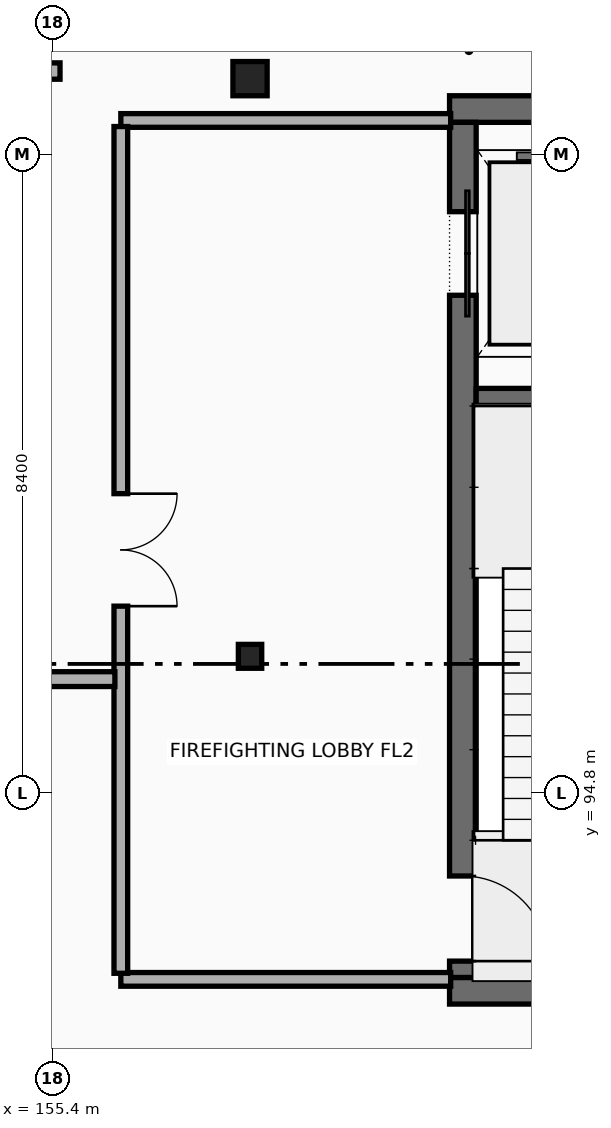
"""IFC4 building model, lengths in metres.
Left out: names, types, materials, properties, quantities, classifications, styles, units other than length and angle.
Written with IfcOpenShell. Run it as: python <this file> out.ifc"""

import sys

from ifc_helpers import new_model, si_unit, direction, frame, frame_2d, origin, origin_2d, place, context, subcontext, project, spatial, rectangle, i_section, extrude, element, fill, save


model = new_model("IFC4")
c1 = context("Model", 3, precision=1e-05, world=origin(), true_north=direction((0.0, 1.0)))
c2 = subcontext(c1, "Body", "Model", "MODEL_VIEW")
j1 = project(units=[si_unit("LENGTHUNIT", "METRE"), si_unit("PLANEANGLEUNIT", "RADIAN")], contexts=[c1])
p1 = place(None, origin())
s1 = spatial("IfcSite", under=j1, at=p1, CompositionType="ELEMENT")
p2 = place(p1, origin())
s2 = spatial("IfcBuilding", under=s1, at=p2, CompositionType="ELEMENT")
p3 = place(p2, origin())
s3 = spatial("IfcBuildingStorey", under=s2, at=p3, CompositionType="ELEMENT", Elevation=0.0)
for number, where, z_axis, x_axis in (
    (1, (160.625, 92.2, 0.0), (0.0, 0.0, 1.0), (1.0, 0.0, 0.0)),
    (2, (165.375, 103.8, 0.0), (0.0, 0.0, 1.0), (-1.0, 0.0, 0.0)),
):
    element("IfcWall", number, at=place(p3, frame(where, z_axis=z_axis, x_axis=x_axis)), inside=s3, PredefinedType="SHEAR", context=c2, shape_type="SweptSolid", body=[
        extrude(rectangle(XDim=4.75, YDim=0.35, at=frame_2d((2.375, 0.0))), origin(), (0.0, 0.0, 1.0), 4.8),
    ])
p4 = place(p3, frame((160.8, 103.625, 0.0), z_axis=(0.0, 0.0, 1.0), x_axis=(0.0, -1.0, 0.0)))
e3 = element("IfcWall", 3, at=p4, inside=s3, PredefinedType="SHEAR", context=c2, shape_type="SweptSolid", body=[
    extrude(rectangle(XDim=11.25, YDim=0.35, at=frame_2d((5.625, 0.0))), origin(), (0.0, 0.0, 1.0), 4.8),
])
p5 = place(p4, frame((1.175, 0.0, 0.0)))
e4 = element("IfcOpeningElement", 4, at=p5, cuts=e3, PredefinedType="OPENING", context=c2, shape_type="SweptSolid", body=[
    extrude(rectangle(XDim=1.1, YDim=2.2, at=frame_2d((0.55, 1.1))), frame((0.0, 0.185, 0.0), z_axis=(0.0, -1.0, 0.0), x_axis=(1.0, 0.0, 0.0)), (0.0, 0.0, 1.0), 0.37),
])
p6 = place(p4, frame((9.915, 0.0, 0.0)))
e5 = element("IfcOpeningElement", 5, at=p6, cuts=e3, PredefinedType="OPENING", context=c2, shape_type="SweptSolid", body=[
    extrude(rectangle(XDim=1.12, YDim=2.16, at=frame_2d((0.56, 1.08))), frame((0.0, 0.185, 0.0), z_axis=(0.0, -1.0, 0.0), x_axis=(1.0, 0.0, 0.0)), (0.0, 0.0, 1.0), 0.37),
])
p7 = place(p3, frame((160.975, 100.0, 0.0), z_axis=(0.0, 0.0, 1.0), x_axis=(1.0, 0.0, 0.0)))
e6 = element("IfcWall", 6, at=p7, inside=s3, PredefinedType="SHEAR", context=c2, shape_type="SweptSolid", body=[
    extrude(rectangle(XDim=4.05, YDim=0.25, at=frame_2d((2.025, 0.0))), origin(), (0.0, 0.0, 1.0), 4.8),
])
p8 = place(p3, frame((158.0, 96.6, 0.0), z_axis=(0.0, 0.0, 1.0), x_axis=(1.0, 0.0, 0.0)))
e7 = element("IfcColumn", 7, at=p8, inside=s3, PredefinedType="COLUMN", context=c2, shape_type="SweptSolid", body=[
    extrude(i_section(OverallWidth=0.307, OverallDepth=0.314, WebThickness=0.012, FlangeThickness=0.019, at=origin_2d()), origin(), (0.0, 0.0, 1.0), 4.8),
])
p9 = place(p3, frame((158.0, 104.2, 0.0), z_axis=(0.0, 0.0, 1.0), x_axis=(1.0, 0.0, 0.0)))
e8 = element("IfcColumn", 8, at=p9, inside=s3, PredefinedType="COLUMN", context=c2, shape_type="SweptSolid", body=[
    extrude(rectangle(XDim=0.45, YDim=0.45, at=origin_2d()), origin(), (0.0, 0.0, 1.0), 4.8),
])
p10 = place(p3, frame((156.3, 92.35, 0.0), z_axis=(0.0, 0.0, 1.0), x_axis=(1.0, 0.0, 0.0)))
e9 = element("IfcWall", 9, at=p10, inside=s3, PredefinedType="PARTITIONING", context=c2, shape_type="SweptSolid", body=[
    extrude(rectangle(XDim=4.34, YDim=0.18, at=frame_2d((2.17, 0.0))), origin(), (0.0, 0.0, 1.0), 3.753),
])
p11 = place(p3, frame((160.64, 103.65, 0.0), z_axis=(0.0, 0.0, 1.0), x_axis=(-1.0, 0.0, 0.0)))
e10 = element("IfcWall", 10, at=p11, inside=s3, PredefinedType="PARTITIONING", context=c2, shape_type="SweptSolid", body=[
    extrude(rectangle(XDim=4.34, YDim=0.18, at=frame_2d((2.17, 0.0))), origin(), (0.0, 0.0, 1.0), 4.157),
])
p12 = place(p3, frame((156.3, 103.57, 0.0), z_axis=(0.0, 0.0, 1.0), x_axis=(0.0, -1.0, 0.0)))
e11 = element("IfcWall", 11, at=p12, inside=s3, PredefinedType="PARTITIONING", context=c2, shape_type="SweptSolid", body=[
    extrude(rectangle(XDim=11.14, YDim=0.18, at=frame_2d((5.57, 0.0))), origin(), (0.0, 0.0, 1.0), 4.152),
])
p13 = place(p12, frame((4.83, 0.0, 0.0)))
e12 = element("IfcOpeningElement", 12, at=p13, cuts=e11, PredefinedType="OPENING", context=c2, shape_type="SweptSolid", body=[
    extrude(rectangle(XDim=1.48, YDim=2.22, at=frame_2d((0.74, 1.11))), frame((0.0, 0.1, 0.0), z_axis=(0.0, -1.0, 0.0), x_axis=(1.0, 0.0, 0.0)), (0.0, 0.0, 1.0), 0.2),
])
p14 = place(p3, frame((128.341, 96.3, 0.0), z_axis=(0.0, 0.0, 1.0), x_axis=(1.0, 0.0, 0.0)))
e13 = element("IfcWall", 13, at=p14, inside=s3, PredefinedType="PARTITIONING", context=c2, shape_type="SweptSolid", body=[
    extrude(rectangle(XDim=27.881, YDim=0.195, at=frame_2d((13.94, 0.0))), origin(), (0.0, 0.0, 1.0), 3.753),
])
p15 = place(p3, frame((130.354, 104.3, 0.0), z_axis=(0.0, 0.0, 1.0), x_axis=(1.0, 0.0, 0.0)))
e14 = element("IfcWall", 14, at=p15, inside=s3, PredefinedType="PARTITIONING", context=c2, shape_type="SweptSolid", body=[
    extrude(rectangle(XDim=25.146, YDim=0.215, at=frame_2d((12.573, 0.0))), origin(), (0.0, 0.0, 1.0), 3.753),
])
p16 = place(p5, origin())
e15 = element("IfcDoor", 15, at=p16, inside=s3, OperationType="DOUBLE_DOOR_SLIDING", PredefinedType="DOOR", context=c2, shape_type="SweptSolid", body=[
    extrude(rectangle(XDim=1.1, YDim=2.2, at=frame_2d((0.55, 1.1))), frame((0.0, 0.025, 0.0), z_axis=(0.0, -1.0, 0.0), x_axis=(1.0, 0.0, 0.0)), (0.0, 0.0, 1.0), 0.05),
])
fill(e4, e15)
p17 = place(p6, origin())
e16 = element("IfcDoor", 16, at=p17, inside=s3, OperationType="SINGLE_SWING_RIGHT", PredefinedType="DOOR", context=c2, shape_type="SweptSolid", body=[
    extrude(rectangle(XDim=1.12, YDim=2.16, at=frame_2d((0.56, 1.08))), frame((0.0, 0.025, 0.0), z_axis=(0.0, -1.0, 0.0), x_axis=(1.0, 0.0, 0.0)), (0.0, 0.0, 1.0), 0.05),
])
fill(e5, e16)
p18 = place(p13, origin())
e17 = element("IfcDoor", 17, at=p18, inside=s3, OperationType="DOUBLE_DOOR_SINGLE_SWING", PredefinedType="DOOR", context=c2, shape_type="SweptSolid", body=[
    extrude(rectangle(XDim=1.48, YDim=2.22, at=frame_2d((0.74, 1.11))), frame((0.0, 0.025, 0.0), z_axis=(0.0, -1.0, 0.0), x_axis=(1.0, 0.0, 0.0)), (0.0, 0.0, 1.0), 0.05),
])
fill(e12, e17)
save(model, sys.argv[1])
